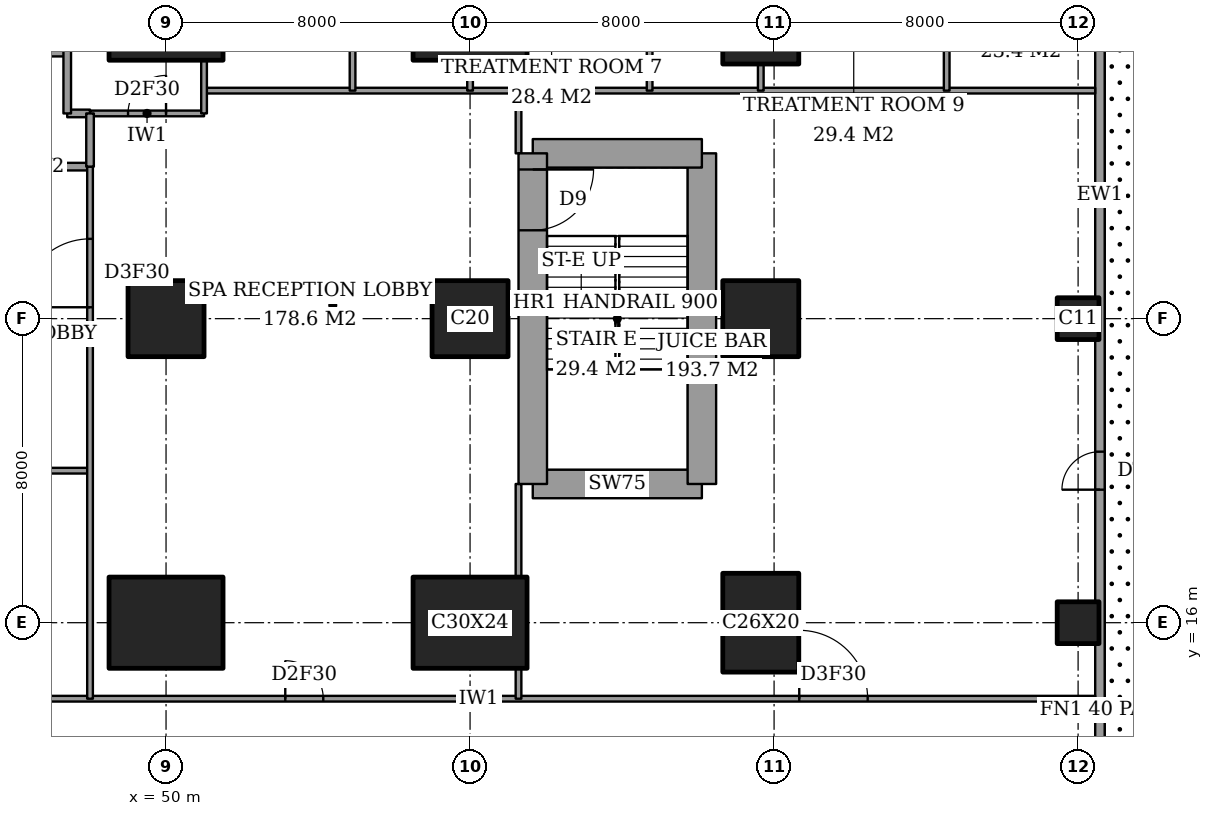
"""IFC4 building model, lengths in metres.
Left out: names, types, materials, properties, quantities, classifications, styles, units other than length and angle.
Written with IfcOpenShell. Run it as: python <this file> out.ifc"""

import sys

from ifc_helpers import new_model, si_unit, direction, frame, frame_2d, origin, origin_2d, place, context, subcontext, project, spatial, rectangle, extrude, element, fill, save


model = new_model("IFC4")
c1 = context("Model", 3, precision=1e-05, world=origin(), true_north=direction((0.0, 1.0)))
c2 = subcontext(c1, "Body", "Model", "MODEL_VIEW")
j1 = project(units=[si_unit("LENGTHUNIT", "METRE"), si_unit("PLANEANGLEUNIT", "RADIAN")], contexts=[c1])
p1 = place(None, origin())
s1 = spatial("IfcSite", under=j1, at=p1, CompositionType="ELEMENT")
p2 = place(p1, origin())
s2 = spatial("IfcBuilding", under=s1, at=p2, CompositionType="ELEMENT")
p3 = place(p2, frame((0.0, 0.0, 11.0)))
s3 = spatial("IfcBuildingStorey", under=s2, at=p3, CompositionType="ELEMENT", Elevation=11.0)
p4 = place(p3, frame((50.0, 16.0, 0.0), z_axis=(0.0, 0.0, 1.0), x_axis=(1.0, 0.0, 0.0)))
e1 = element("IfcColumn", 1, at=p4, inside=s3, PredefinedType="COLUMN", context=c2, shape_type="SweptSolid", body=[
    extrude(rectangle(XDim=3.0, YDim=2.4, at=origin_2d()), origin(), (0.0, 0.0, 1.0), 5.0),
])
p5 = place(p3, frame((50.0, 24.0, 0.0), z_axis=(0.0, 0.0, 1.0), x_axis=(1.0, 0.0, 0.0)))
e2 = element("IfcColumn", 2, at=p5, inside=s3, PredefinedType="COLUMN", context=c2, shape_type="SweptSolid", body=[
    extrude(rectangle(XDim=2.0, YDim=2.0, at=origin_2d()), origin(), (0.0, 0.0, 1.0), 5.0),
])
for number, where, z_axis, x_axis in (
    (3, (50.0, 32.0, 0.0), (0.0, 0.0, 1.0), (1.0, 0.0, 0.0)),
    (4, (58.0, 16.0, 0.0), (0.0, 0.0, 1.0), (1.0, 0.0, 0.0)),
):
    element("IfcColumn", number, at=place(p3, frame(where, z_axis=z_axis, x_axis=x_axis)), inside=s3, PredefinedType="COLUMN", context=c2, shape_type="SweptSolid", body=[
        extrude(rectangle(XDim=3.0, YDim=2.4, at=origin_2d()), origin(), (0.0, 0.0, 1.0), 5.0),
    ])
p6 = place(p3, frame((58.0, 24.0, 0.0), z_axis=(0.0, 0.0, 1.0), x_axis=(1.0, 0.0, 0.0)))
e5 = element("IfcColumn", 5, at=p6, inside=s3, PredefinedType="COLUMN", context=c2, shape_type="SweptSolid", body=[
    extrude(rectangle(XDim=2.0, YDim=2.0, at=origin_2d()), origin(), (0.0, 0.0, 1.0), 5.0),
])
p7 = place(p3, frame((58.0, 32.0, 0.0), z_axis=(0.0, 0.0, 1.0), x_axis=(1.0, 0.0, 0.0)))
e6 = element("IfcColumn", 6, at=p7, inside=s3, PredefinedType="COLUMN", context=c2, shape_type="SweptSolid", body=[
    extrude(rectangle(XDim=3.0, YDim=2.4, at=origin_2d()), origin(), (0.0, 0.0, 1.0), 5.0),
])
p8 = place(p3, frame((65.65, 16.0, 0.0), z_axis=(0.0, 0.0, 1.0), x_axis=(0.0, 1.0, 0.0)))
e7 = element("IfcColumn", 7, at=p8, inside=s3, PredefinedType="COLUMN", context=c2, shape_type="SweptSolid", body=[
    extrude(rectangle(XDim=2.6, YDim=2.0, at=origin_2d()), origin(), (0.0, 0.0, 1.0), 5.0),
])
p9 = place(p3, frame((65.65, 24.0, 0.0), z_axis=(0.0, 0.0, 1.0), x_axis=(1.0, 0.0, 0.0)))
e8 = element("IfcColumn", 8, at=p9, inside=s3, PredefinedType="COLUMN", context=c2, shape_type="SweptSolid", body=[
    extrude(rectangle(XDim=2.0, YDim=2.0, at=origin_2d()), origin(), (0.0, 0.0, 1.0), 5.0),
])
p10 = place(p3, frame((65.65, 32.0, 0.0), z_axis=(0.0, 0.0, 1.0), x_axis=(0.0, 1.0, 0.0)))
e9 = element("IfcColumn", 9, at=p10, inside=s3, PredefinedType="COLUMN", context=c2, shape_type="SweptSolid", body=[
    extrude(rectangle(XDim=2.6, YDim=2.0, at=origin_2d()), origin(), (0.0, 0.0, 1.0), 5.0),
])
for number, where, z_axis, x_axis in (
    (10, (74.0, 16.0, 0.0), (0.0, 0.0, 1.0), (1.0, 0.0, 0.0)),
    (11, (74.0, 24.0, 0.0), (0.0, 0.0, 1.0), (1.0, 0.0, 0.0)),
):
    element("IfcColumn", number, at=place(p3, frame(where, z_axis=z_axis, x_axis=x_axis)), inside=s3, PredefinedType="COLUMN", context=c2, shape_type="SweptSolid", body=[
        extrude(rectangle(XDim=1.1, YDim=1.1, at=origin_2d()), origin(), (0.0, 0.0, 1.0), 5.0),
    ])
p11 = place(p3, frame((59.65, 19.65, 0.0), z_axis=(0.0, 0.0, 1.0), x_axis=(1.0, 0.0, 0.0)))
e12 = element("IfcWall", 12, at=p11, inside=s3, PredefinedType="SHEAR", context=c2, shape_type="SweptSolid", body=[
    extrude(rectangle(XDim=4.45, YDim=0.75, at=frame_2d((2.225, 0.0))), origin(), (0.0, 0.0, 1.0), 5.0),
])
p12 = place(p3, frame((64.1, 19.65, 0.0), z_axis=(0.0, 0.0, 1.0), x_axis=(0.0, 1.0, 0.0)))
e13 = element("IfcWall", 13, at=p12, inside=s3, PredefinedType="SHEAR", context=c2, shape_type="SweptSolid", body=[
    extrude(rectangle(XDim=8.7, YDim=0.75, at=frame_2d((4.35, 0.0))), origin(), (0.0, 0.0, 1.0), 5.0),
])
p13 = place(p3, frame((64.1, 28.35, 0.0), z_axis=(0.0, 0.0, 1.0), x_axis=(-1.0, 0.0, 0.0)))
e14 = element("IfcWall", 14, at=p13, inside=s3, PredefinedType="SHEAR", context=c2, shape_type="SweptSolid", body=[
    extrude(rectangle(XDim=4.45, YDim=0.75, at=frame_2d((2.225, 0.0))), origin(), (0.0, 0.0, 1.0), 5.0),
])
p14 = place(p3, frame((59.65, 28.35, 0.0), z_axis=(0.0, 0.0, 1.0), x_axis=(0.0, -1.0, 0.0)))
e15 = element("IfcWall", 15, at=p14, inside=s3, PredefinedType="SHEAR", context=c2, shape_type="SweptSolid", body=[
    extrude(rectangle(XDim=8.7, YDim=0.75, at=frame_2d((4.35, 0.0))), origin(), (0.0, 0.0, 1.0), 5.0),
])
p15 = place(p14, frame((0.425, 0.0, 0.0)))
e16 = element("IfcOpeningElement", 16, at=p15, cuts=e15, PredefinedType="OPENING", context=c2, shape_type="SweptSolid", body=[
    extrude(rectangle(XDim=1.6, YDim=2.1, at=frame_2d((0.8, 1.05))), frame((0.0, 0.385, 0.0), z_axis=(0.0, -1.0, 0.0), x_axis=(1.0, 0.0, 0.0)), (0.0, 0.0, 1.0), 0.77),
])
p16 = place(p3, frame((74.575, -8.575, 0.0), z_axis=(0.0, 0.0, 1.0), x_axis=(0.0, 1.0, 0.0)))
e17 = element("IfcWall", 17, at=p16, inside=s3, PredefinedType="SOLIDWALL", context=c2, shape_type="SweptSolid", body=[
    extrude(rectangle(XDim=65.15, YDim=0.25, at=frame_2d((32.575, 0.0))), origin(), (0.0, 0.0, 1.0), 5.0),
])
p17 = place(p16, frame((12.075, 0.0, 0.0)))
e18 = element("IfcOpeningElement", 18, at=p17, cuts=e17, PredefinedType="OPENING", context=c2, shape_type="SweptSolid", body=[
    extrude(rectangle(XDim=1.0, YDim=2.4, at=frame_2d((0.5, 1.2))), frame((0.0, 0.135, 0.0), z_axis=(0.0, -1.0, 0.0), x_axis=(1.0, 0.0, 0.0)), (0.0, 0.0, 1.0), 0.27),
])
p18 = place(p16, frame((28.075, 0.0, 0.0)))
e19 = element("IfcOpeningElement", 19, at=p18, cuts=e17, PredefinedType="OPENING", context=c2, shape_type="SweptSolid", body=[
    extrude(rectangle(XDim=1.0, YDim=2.4, at=frame_2d((0.5, 1.2))), frame((0.0, 0.135, 0.0), z_axis=(0.0, -1.0, 0.0), x_axis=(1.0, 0.0, 0.0)), (0.0, 0.0, 1.0), 0.27),
])
p19 = place(p16, frame((41.275, 0.0, 0.0)))
e20 = element("IfcOpeningElement", 20, at=p19, cuts=e17, PredefinedType="OPENING", context=c2, shape_type="SweptSolid", body=[
    extrude(rectangle(XDim=1.0, YDim=2.4, at=frame_2d((0.5, 1.2))), frame((0.0, 0.135, 0.0), z_axis=(0.0, -1.0, 0.0), x_axis=(1.0, 0.0, 0.0)), (0.0, 0.0, 1.0), 0.27),
])
p20 = place(p3, frame((42.0, 14.0, 0.0), z_axis=(0.0, 0.0, 1.0), x_axis=(1.0, 0.0, 0.0)))
e21 = element("IfcWall", 21, at=p20, inside=s3, PredefinedType="PARTITIONING", context=c2, shape_type="SweptSolid", body=[
    extrude(rectangle(XDim=32.45, YDim=0.15, at=frame_2d((16.225, 0.0))), origin(), (0.0, 0.0, 1.0), 4.7),
])
p21 = place(p20, frame((11.137, 0.0, 0.0)))
e22 = element("IfcOpeningElement", 22, at=p21, cuts=e21, PredefinedType="OPENING", context=c2, shape_type="SweptSolid", body=[
    extrude(rectangle(XDim=1.0, YDim=2.1, at=frame_2d((0.5, 1.05))), frame((0.0, 0.085, 0.0), z_axis=(0.0, -1.0, 0.0), x_axis=(1.0, 0.0, 0.0)), (0.0, 0.0, 1.0), 0.17),
])
p22 = place(p20, frame((24.663, 0.0, 0.0)))
e23 = element("IfcOpeningElement", 23, at=p22, cuts=e21, PredefinedType="OPENING", context=c2, shape_type="SweptSolid", body=[
    extrude(rectangle(XDim=1.8, YDim=2.1, at=frame_2d((0.9, 1.05))), frame((0.0, 0.085, 0.0), z_axis=(0.0, -1.0, 0.0), x_axis=(1.0, 0.0, 0.0)), (0.0, 0.0, 1.0), 0.17),
])
p23 = place(p3, frame((42.0, 20.0, 0.0), z_axis=(0.0, 0.0, 1.0), x_axis=(1.0, 0.0, 0.0)))
e24 = element("IfcWall", 24, at=p23, inside=s3, PredefinedType="PARTITIONING", context=c2, shape_type="SweptSolid", body=[
    extrude(rectangle(XDim=6.0, YDim=0.15, at=frame_2d((3.0, 0.0))), origin(), (0.0, 0.0, 1.0), 4.7),
])
p24 = place(p23, frame((2.55, 0.0, 0.0)))
e25 = element("IfcOpeningElement", 25, at=p24, cuts=e24, PredefinedType="OPENING", context=c2, shape_type="SweptSolid", body=[
    extrude(rectangle(XDim=0.9, YDim=2.1, at=frame_2d((0.45, 1.05))), frame((0.0, 0.085, 0.0), z_axis=(0.0, -1.0, 0.0), x_axis=(1.0, 0.0, 0.0)), (0.0, 0.0, 1.0), 0.17),
])
p25 = place(p3, frame((42.0, 28.0, 0.0), z_axis=(0.0, 0.0, 1.0), x_axis=(1.0, 0.0, 0.0)))
e26 = element("IfcWall", 26, at=p25, inside=s3, PredefinedType="PARTITIONING", context=c2, shape_type="SweptSolid", body=[
    extrude(rectangle(XDim=6.0, YDim=0.2, at=frame_2d((3.0, 0.0))), origin(), (0.0, 0.0, 1.0), 4.7),
])
p26 = place(p25, frame((2.55, 0.0, 0.0)))
e27 = element("IfcOpeningElement", 27, at=p26, cuts=e26, PredefinedType="OPENING", context=c2, shape_type="SweptSolid", body=[
    extrude(rectangle(XDim=0.9, YDim=2.1, at=frame_2d((0.45, 1.05))), frame((0.0, 0.11, 0.0), z_axis=(0.0, -1.0, 0.0), x_axis=(1.0, 0.0, 0.0)), (0.0, 0.0, 1.0), 0.22),
])
p27 = place(p3, frame((47.4, 29.4, 0.0), z_axis=(0.0, 0.0, 1.0), x_axis=(1.0, 0.0, 0.0)))
e28 = element("IfcWall", 28, at=p27, inside=s3, PredefinedType="PARTITIONING", context=c2, shape_type="SweptSolid", body=[
    extrude(rectangle(XDim=0.6, YDim=0.2, at=frame_2d((0.3, 0.0))), origin(), (0.0, 0.0, 1.0), 4.7),
])
p28 = place(p3, frame((48.0, 29.4, 0.0), z_axis=(0.0, 0.0, 1.0), x_axis=(1.0, 0.0, 0.0)))
e29 = element("IfcWall", 29, at=p28, inside=s3, PredefinedType="PARTITIONING", context=c2, shape_type="SweptSolid", body=[
    extrude(rectangle(XDim=3.0, YDim=0.15, at=frame_2d((1.5, 0.0))), origin(), (0.0, 0.0, 1.0), 4.7),
])
p29 = place(p28, frame((1.0, 0.0, 0.0)))
e30 = element("IfcOpeningElement", 30, at=p29, cuts=e29, PredefinedType="OPENING", context=c2, shape_type="SweptSolid", body=[
    extrude(rectangle(XDim=1.0, YDim=2.1, at=frame_2d((0.5, 1.05))), frame((0.0, 0.085, 0.0), z_axis=(0.0, -1.0, 0.0), x_axis=(1.0, 0.0, 0.0)), (0.0, 0.0, 1.0), 0.17),
])
p30 = place(p3, frame((51.0, 30.0, 0.0), z_axis=(0.0, 0.0, 1.0), x_axis=(1.0, 0.0, 0.0)))
e31 = element("IfcWall", 31, at=p30, inside=s3, PredefinedType="PARTITIONING", context=c2, shape_type="SweptSolid", body=[
    extrude(rectangle(XDim=23.45, YDim=0.15, at=frame_2d((11.725, 0.0))), origin(), (0.0, 0.0, 1.0), 4.7),
])
p31 = place(p3, frame((42.0, 31.0, 0.0), z_axis=(0.0, 0.0, 1.0), x_axis=(1.0, 0.0, 0.0)))
e32 = element("IfcWall", 32, at=p31, inside=s3, PredefinedType="PARTITIONING", context=c2, shape_type="SweptSolid", body=[
    extrude(rectangle(XDim=5.4, YDim=0.2, at=frame_2d((2.7, 0.0))), origin(), (0.0, 0.0, 1.0), 4.7),
])
p32 = place(p31, frame((2.2, 0.0, 0.0)))
e33 = element("IfcOpeningElement", 33, at=p32, cuts=e32, PredefinedType="OPENING", context=c2, shape_type="SweptSolid", body=[
    extrude(rectangle(XDim=1.0, YDim=2.1, at=frame_2d((0.5, 1.05))), frame((0.0, 0.11, 0.0), z_axis=(0.0, -1.0, 0.0), x_axis=(1.0, 0.0, 0.0)), (0.0, 0.0, 1.0), 0.22),
])
p33 = place(p3, frame((47.4, 29.4, 0.0), z_axis=(0.0, 0.0, 1.0), x_axis=(0.0, 1.0, 0.0)))
e34 = element("IfcWall", 34, at=p33, inside=s3, PredefinedType="PARTITIONING", context=c2, shape_type="SweptSolid", body=[
    extrude(rectangle(XDim=27.161, YDim=0.2, at=frame_2d((13.581, 0.0))), origin(), (0.0, 0.0, 1.0), 4.7),
])
p34 = place(p3, frame((48.0, 28.0, 0.0), z_axis=(0.0, 0.0, 1.0), x_axis=(0.0, 1.0, 0.0)))
e35 = element("IfcWall", 35, at=p34, inside=s3, PredefinedType="PARTITIONING", context=c2, shape_type="SweptSolid", body=[
    extrude(rectangle(XDim=1.4, YDim=0.2, at=frame_2d((0.7, 0.0))), origin(), (0.0, 0.0, 1.0), 4.7),
])
p35 = place(p3, frame((48.0, 14.0, 0.0), z_axis=(0.0, 0.0, 1.0), x_axis=(0.0, 1.0, 0.0)))
e36 = element("IfcWall", 36, at=p35, inside=s3, PredefinedType="PARTITIONING", context=c2, shape_type="SweptSolid", body=[
    extrude(rectangle(XDim=14.0, YDim=0.15, at=frame_2d((7.0, 0.0))), origin(), (0.0, 0.0, 1.0), 4.7),
])
p36 = place(p35, frame((10.3, 0.0, 0.0)))
e37 = element("IfcOpeningElement", 37, at=p36, cuts=e36, PredefinedType="OPENING", context=c2, shape_type="SweptSolid", body=[
    extrude(rectangle(XDim=1.8, YDim=2.1, at=frame_2d((0.9, 1.05))), frame((0.0, 0.085, 0.0), z_axis=(0.0, -1.0, 0.0), x_axis=(1.0, 0.0, 0.0)), (0.0, 0.0, 1.0), 0.17),
])
p37 = place(p3, frame((51.0, 29.4, 0.0), z_axis=(0.0, 0.0, 1.0), x_axis=(0.0, 1.0, 0.0)))
e38 = element("IfcWall", 38, at=p37, inside=s3, PredefinedType="PARTITIONING", context=c2, shape_type="SweptSolid", body=[
    extrude(rectangle(XDim=1.4, YDim=0.15, at=frame_2d((0.7, 0.0))), origin(), (0.0, 0.0, 1.0), 4.7),
])
p38 = place(p3, frame((54.908, 30.0, 0.0), z_axis=(0.0, 0.0, 1.0), x_axis=(0.0, 1.0, 0.0)))
e39 = element("IfcWall", 39, at=p38, inside=s3, PredefinedType="PARTITIONING", context=c2, shape_type="SweptSolid", body=[
    extrude(rectangle(XDim=6.0, YDim=0.15, at=frame_2d((3.0, 0.0))), origin(), (0.0, 0.0, 1.0), 4.7),
])
p39 = place(p3, frame((58.0, 30.0, 0.0), z_axis=(0.0, 0.0, 1.0), x_axis=(0.0, 1.0, 0.0)))
e40 = element("IfcWall", 40, at=p39, inside=s3, PredefinedType="PARTITIONING", context=c2, shape_type="SweptSolid", body=[
    extrude(rectangle(XDim=0.8, YDim=0.15, at=frame_2d((0.4, 0.0))), origin(), (0.0, 0.0, 1.0), 3.3),
])
p40 = place(p3, frame((59.275, 14.0, 0.0), z_axis=(0.0, 0.0, 1.0), x_axis=(0.0, 1.0, 0.0)))
e41 = element("IfcWall", 41, at=p40, inside=s3, PredefinedType="PARTITIONING", context=c2, shape_type="SweptSolid", body=[
    extrude(rectangle(XDim=0.8, YDim=0.15, at=frame_2d((0.4, 0.0))), origin(), (0.0, 0.0, 1.0), 4.7),
])
p41 = place(p3, frame((59.275, 17.2, 0.0), z_axis=(0.0, 0.0, 1.0), x_axis=(0.0, 1.0, 0.0)))
e42 = element("IfcWall", 42, at=p41, inside=s3, PredefinedType="PARTITIONING", context=c2, shape_type="SweptSolid", body=[
    extrude(rectangle(XDim=2.45, YDim=0.15, at=frame_2d((1.225, 0.0))), origin(), (0.0, 0.0, 1.0), 4.7),
])
p42 = place(p3, frame((59.275, 28.35, 0.0), z_axis=(0.0, 0.0, 1.0), x_axis=(0.0, 1.0, 0.0)))
e43 = element("IfcWall", 43, at=p42, inside=s3, PredefinedType="PARTITIONING", context=c2, shape_type="SweptSolid", body=[
    extrude(rectangle(XDim=1.65, YDim=0.15, at=frame_2d((0.825, 0.0))), origin(), (0.0, 0.0, 1.0), 4.7),
])
p43 = place(p3, frame((62.725, 30.0, 0.0), z_axis=(0.0, 0.0, 1.0), x_axis=(0.0, 1.0, 0.0)))
e44 = element("IfcWall", 44, at=p43, inside=s3, PredefinedType="PARTITIONING", context=c2, shape_type="SweptSolid", body=[
    extrude(rectangle(XDim=6.0, YDim=0.15, at=frame_2d((3.0, 0.0))), origin(), (0.0, 0.0, 1.0), 4.7),
])
p44 = place(p3, frame((65.65, 30.0, 0.0), z_axis=(0.0, 0.0, 1.0), x_axis=(0.0, 1.0, 0.0)))
e45 = element("IfcWall", 45, at=p44, inside=s3, PredefinedType="PARTITIONING", context=c2, shape_type="SweptSolid", body=[
    extrude(rectangle(XDim=1.0, YDim=0.15, at=frame_2d((0.5, 0.0))), origin(), (0.0, 0.0, 1.0), 3.3),
])
p45 = place(p3, frame((70.542, 30.0, 0.0), z_axis=(0.0, 0.0, 1.0), x_axis=(0.0, 1.0, 0.0)))
e46 = element("IfcWall", 46, at=p45, inside=s3, PredefinedType="PARTITIONING", context=c2, shape_type="SweptSolid", body=[
    extrude(rectangle(XDim=6.0, YDim=0.15, at=frame_2d((3.0, 0.0))), origin(), (0.0, 0.0, 1.0), 4.7),
])
p46 = place(p18, origin())
e47 = element("IfcDoor", 47, at=p46, inside=s3, OperationType="SINGLE_SWING_RIGHT", PredefinedType="DOOR", context=c2, shape_type="SweptSolid", body=[
    extrude(rectangle(XDim=1.0, YDim=2.4, at=frame_2d((0.5, 1.2))), frame((0.0, 0.025, 0.0), z_axis=(0.0, -1.0, 0.0), x_axis=(1.0, 0.0, 0.0)), (0.0, 0.0, 1.0), 0.05),
])
fill(e19, e47)
p47 = place(p29, origin())
e48 = element("IfcDoor", 48, at=p47, inside=s3, OperationType="SINGLE_SWING_LEFT", PredefinedType="DOOR", context=c2, shape_type="SweptSolid", body=[
    extrude(rectangle(XDim=1.0, YDim=2.1, at=frame_2d((0.5, 1.05))), frame((0.0, 0.025, 0.0), z_axis=(0.0, -1.0, 0.0), x_axis=(1.0, 0.0, 0.0)), (0.0, 0.0, 1.0), 0.05),
])
fill(e30, e48)
p48 = place(p36, origin())
e49 = element("IfcDoor", 49, at=p48, inside=s3, OperationType="DOUBLE_DOOR_DOUBLE_SWING", PredefinedType="DOOR", context=c2, shape_type="SweptSolid", body=[
    extrude(rectangle(XDim=1.8, YDim=2.1, at=frame_2d((0.9, 1.05))), frame((0.0, 0.025, 0.0), z_axis=(0.0, -1.0, 0.0), x_axis=(1.0, 0.0, 0.0)), (0.0, 0.0, 1.0), 0.05),
])
fill(e37, e49)
p49 = place(p21, origin())
e50 = element("IfcDoor", 50, at=p49, inside=s3, OperationType="SINGLE_SWING_RIGHT", PredefinedType="DOOR", context=c2, shape_type="SweptSolid", body=[
    extrude(rectangle(XDim=1.0, YDim=2.1, at=frame_2d((0.5, 1.05))), frame((0.0, 0.025, 0.0), z_axis=(0.0, -1.0, 0.0), x_axis=(1.0, 0.0, 0.0)), (0.0, 0.0, 1.0), 0.05),
])
fill(e22, e50)
p50 = place(p22, origin())
e51 = element("IfcDoor", 51, at=p50, inside=s3, OperationType="DOUBLE_DOOR_DOUBLE_SWING", PredefinedType="DOOR", context=c2, shape_type="SweptSolid", body=[
    extrude(rectangle(XDim=1.8, YDim=2.1, at=frame_2d((0.9, 1.05))), frame((0.0, 0.025, 0.0), z_axis=(0.0, -1.0, 0.0), x_axis=(1.0, 0.0, 0.0)), (0.0, 0.0, 1.0), 0.05),
])
fill(e23, e51)
p51 = place(p15, origin())
e52 = element("IfcDoor", 52, at=p51, inside=s3, OperationType="DOUBLE_DOOR_SINGLE_SWING", PredefinedType="DOOR", context=c2, shape_type="SweptSolid", body=[
    extrude(rectangle(XDim=1.6, YDim=2.1, at=frame_2d((0.8, 1.05))), frame((0.0, 0.025, 0.0), z_axis=(0.0, -1.0, 0.0), x_axis=(1.0, 0.0, 0.0)), (0.0, 0.0, 1.0), 0.05),
])
fill(e16, e52)
save(model, sys.argv[1])
